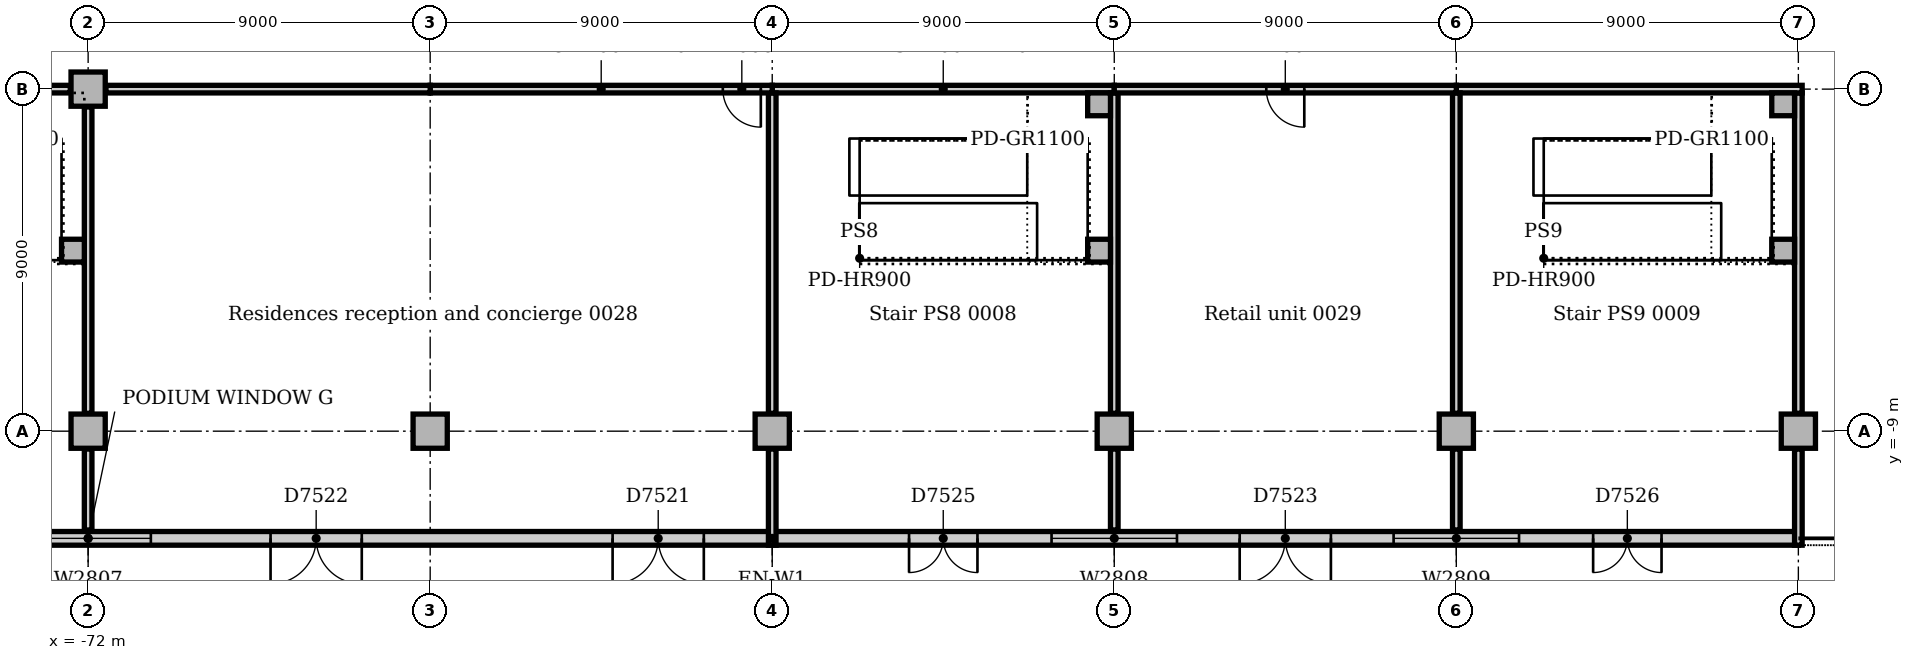
"""IFC4 building model, lengths in metres.
Left out: names, types, materials, properties, quantities, classifications, styles, units other than length and angle.
Written with IfcOpenShell. Run it as: python <this file> out.ifc"""

import sys

from ifc_helpers import new_model, si_unit, direction, frame, frame_2d, origin, origin_2d, place, context, subcontext, project, spatial, rectangle, extrude, element, fill, save


model = new_model("IFC4")
c1 = context("Model", 3, precision=1e-05, world=origin(), true_north=direction((0.0, 1.0)))
c2 = subcontext(c1, "Body", "Model", "MODEL_VIEW")
j1 = project(units=[si_unit("LENGTHUNIT", "METRE"), si_unit("PLANEANGLEUNIT", "RADIAN")], contexts=[c1])
p1 = place(None, origin())
s1 = spatial("IfcSite", under=j1, at=p1, CompositionType="ELEMENT")
p2 = place(p1, origin())
s2 = spatial("IfcBuilding", under=s1, at=p2, CompositionType="ELEMENT")
p3 = place(p2, origin())
s3 = spatial("IfcBuildingStorey", under=s2, at=p3, CompositionType="ELEMENT", Elevation=0.0)
for number, where, z_axis, x_axis in (
    (1, (-72.0, -9.0, 0.0), (0.0, 0.0, 1.0), (1.0, 0.0, 0.0)),
    (2, (-72.0, 0.0, 0.0), (0.0, 0.0, 1.0), (1.0, 0.0, 0.0)),
    (3, (-63.0, -9.0, 0.0), (0.0, 0.0, 1.0), (1.0, 0.0, 0.0)),
    (4, (-54.0, -9.0, 0.0), (0.0, 0.0, 1.0), (1.0, 0.0, 0.0)),
    (5, (-45.0, -9.0, 0.0), (0.0, 0.0, 1.0), (1.0, 0.0, 0.0)),
    (6, (-36.0, -9.0, 0.0), (0.0, 0.0, 1.0), (1.0, 0.0, 0.0)),
    (7, (-27.0, -9.0, 0.0), (0.0, 0.0, 1.0), (1.0, 0.0, 0.0)),
):
    element("IfcColumn", number, at=place(p3, frame(where, z_axis=z_axis, x_axis=x_axis)), inside=s3, PredefinedType="COLUMN", context=c2, shape_type="SweptSolid", body=[
        extrude(rectangle(XDim=0.9, YDim=0.9, at=origin_2d()), origin(), (0.0, 0.0, 1.0), 5.7),
    ])
p4 = place(p3, frame((-81.0, -11.82, 0.0), z_axis=(0.0, 0.0, 1.0), x_axis=(1.0, 0.0, 0.0)))
e8 = element("IfcWall", 8, at=p4, inside=s3, PredefinedType="STANDARD", context=c2, shape_type="SweptSolid", body=[
    extrude(rectangle(XDim=54.0, YDim=0.36, at=frame_2d((27.0, 0.0))), origin(), (0.0, 0.0, 1.0), 5.7),
])
p5 = place(p4, frame((22.8, 0.0, 0.0)))
e9 = element("IfcOpeningElement", 9, at=p5, cuts=e8, PredefinedType="OPENING", context=c2, shape_type="SweptSolid", body=[
    extrude(rectangle(XDim=2.4, YDim=2.4, at=frame_2d((1.2, 1.2))), frame((0.0, 0.19, 0.0), z_axis=(0.0, -1.0, 0.0), x_axis=(1.0, 0.0, 0.0)), (0.0, 0.0, 1.0), 0.38),
])
p6 = place(p4, frame((13.8, 0.0, 0.0)))
e10 = element("IfcOpeningElement", 10, at=p6, cuts=e8, PredefinedType="OPENING", context=c2, shape_type="SweptSolid", body=[
    extrude(rectangle(XDim=2.4, YDim=2.2, at=frame_2d((1.2, 1.1))), frame((0.0, 0.19, 0.0), z_axis=(0.0, -1.0, 0.0), x_axis=(1.0, 0.0, 0.0)), (0.0, 0.0, 1.0), 0.38),
])
p7 = place(p4, frame((39.3, 0.0, 0.0)))
e11 = element("IfcOpeningElement", 11, at=p7, cuts=e8, PredefinedType="OPENING", context=c2, shape_type="SweptSolid", body=[
    extrude(rectangle(XDim=2.4, YDim=2.2, at=frame_2d((1.2, 1.1))), frame((0.0, 0.19, 0.0), z_axis=(0.0, -1.0, 0.0), x_axis=(1.0, 0.0, 0.0)), (0.0, 0.0, 1.0), 0.38),
])
p8 = place(p4, frame((2.1, 0.0, 0.0)))
e12 = element("IfcOpeningElement", 12, at=p8, cuts=e8, PredefinedType="OPENING", context=c2, shape_type="SweptSolid", body=[
    extrude(rectangle(XDim=1.8, YDim=2.2, at=frame_2d((0.9, 1.1))), frame((0.0, 0.19, 0.0), z_axis=(0.0, -1.0, 0.0), x_axis=(1.0, 0.0, 0.0)), (0.0, 0.0, 1.0), 0.38),
])
p9 = place(p4, frame((30.6, 0.0, 0.0)))
e13 = element("IfcOpeningElement", 13, at=p9, cuts=e8, PredefinedType="OPENING", context=c2, shape_type="SweptSolid", body=[
    extrude(rectangle(XDim=1.8, YDim=2.2, at=frame_2d((0.9, 1.1))), frame((0.0, 0.19, 0.0), z_axis=(0.0, -1.0, 0.0), x_axis=(1.0, 0.0, 0.0)), (0.0, 0.0, 1.0), 0.38),
])
p10 = place(p4, frame((48.6, 0.0, 0.0)))
e14 = element("IfcOpeningElement", 14, at=p10, cuts=e8, PredefinedType="OPENING", context=c2, shape_type="SweptSolid", body=[
    extrude(rectangle(XDim=1.8, YDim=2.2, at=frame_2d((0.9, 1.1))), frame((0.0, 0.19, 0.0), z_axis=(0.0, -1.0, 0.0), x_axis=(1.0, 0.0, 0.0)), (0.0, 0.0, 1.0), 0.38),
])
p11 = place(p4, frame((7.35, 0.0, 0.6)))
e15 = element("IfcOpeningElement", 15, at=p11, cuts=e8, PredefinedType="OPENING", context=c2, shape_type="SweptSolid", body=[
    extrude(rectangle(XDim=3.3, YDim=3.0, at=frame_2d((1.65, 1.5))), frame((0.0, 0.19, 0.0), z_axis=(0.0, -1.0, 0.0), x_axis=(1.0, 0.0, 0.0)), (0.0, 0.0, 1.0), 0.38),
])
p12 = place(p4, frame((34.35, 0.0, 0.6)))
e16 = element("IfcOpeningElement", 16, at=p12, cuts=e8, PredefinedType="OPENING", context=c2, shape_type="SweptSolid", body=[
    extrude(rectangle(XDim=3.3, YDim=3.0, at=frame_2d((1.65, 1.5))), frame((0.0, 0.19, 0.0), z_axis=(0.0, -1.0, 0.0), x_axis=(1.0, 0.0, 0.0)), (0.0, 0.0, 1.0), 0.38),
])
p13 = place(p4, frame((43.35, 0.0, 0.6)))
e17 = element("IfcOpeningElement", 17, at=p13, cuts=e8, PredefinedType="OPENING", context=c2, shape_type="SweptSolid", body=[
    extrude(rectangle(XDim=3.3, YDim=3.0, at=frame_2d((1.65, 1.5))), frame((0.0, 0.19, 0.0), z_axis=(0.0, -1.0, 0.0), x_axis=(1.0, 0.0, 0.0)), (0.0, 0.0, 1.0), 0.38),
])
for number, where, z_axis, x_axis in (
    (18, (-72.4, -4.25, 0.0), (0.0, 0.0, 1.0), (1.0, 0.0, 0.0)),
    (19, (-45.4, -4.25, 0.0), (0.0, 0.0, 1.0), (1.0, 0.0, 0.0)),
    (20, (-45.4, -0.4, 0.0), (0.0, 0.0, 1.0), (1.0, 0.0, 0.0)),
    (21, (-27.4, -4.25, 0.0), (0.0, 0.0, 1.0), (1.0, 0.0, 0.0)),
    (22, (-27.4, -0.4, 0.0), (0.0, 0.0, 1.0), (1.0, 0.0, 0.0)),
):
    element("IfcColumn", number, at=place(p3, frame(where, z_axis=z_axis, x_axis=x_axis)), inside=s3, PredefinedType="COLUMN", context=c2, shape_type="SweptSolid", body=[
        extrude(rectangle(XDim=0.6, YDim=0.6, at=origin_2d()), origin(), (0.0, 0.0, 1.0), 6.0),
    ])
p14 = place(p3, frame((-80.53, 0.0, 0.0), z_axis=(0.0, 0.0, 1.0), x_axis=(1.0, 0.0, 0.0)))
e23 = element("IfcWall", 23, at=p14, inside=s3, PredefinedType="SOLIDWALL", context=c2, shape_type="SweptSolid", body=[
    extrude(rectangle(XDim=8.06, YDim=0.2, at=frame_2d((4.03, 0.0))), origin(), (0.0, 0.0, 1.0), 5.7),
])
p15 = place(p3, frame((-72.0, -11.6, 0.0), z_axis=(0.0, 0.0, 1.0), x_axis=(0.0, 1.0, 0.0)))
e24 = element("IfcWall", 24, at=p15, inside=s3, PredefinedType="SOLIDWALL", context=c2, shape_type="SweptSolid", body=[
    extrude(rectangle(XDim=2.13, YDim=0.2, at=frame_2d((1.065, 0.0))), origin(), (0.0, 0.0, 1.0), 5.7),
])
p16 = place(p3, frame((-72.0, -8.53, 0.0), z_axis=(0.0, 0.0, 1.0), x_axis=(0.0, 1.0, 0.0)))
e25 = element("IfcWall", 25, at=p16, inside=s3, PredefinedType="SOLIDWALL", context=c2, shape_type="SweptSolid", body=[
    extrude(rectangle(XDim=8.06, YDim=0.2, at=frame_2d((4.03, 0.0))), origin(), (0.0, 0.0, 1.0), 5.7),
])
p17 = place(p3, frame((-54.0, 0.0, 0.0), z_axis=(0.0, 0.0, 1.0), x_axis=(1.0, 0.0, 0.0)))
e26 = element("IfcWall", 26, at=p17, inside=s3, PredefinedType="SOLIDWALL", context=c2, shape_type="SweptSolid", body=[
    extrude(rectangle(XDim=9.0, YDim=0.2, at=frame_2d((4.5, 0.0))), origin(), (0.0, 0.0, 1.0), 5.7),
])
p18 = place(p3, frame((-54.0, -12.0, 0.0), z_axis=(0.0, 0.0, 1.0), x_axis=(0.0, 1.0, 0.0)))
e27 = element("IfcWall", 27, at=p18, inside=s3, PredefinedType="SOLIDWALL", context=c2, shape_type="SweptSolid", body=[
    extrude(rectangle(XDim=2.53, YDim=0.2, at=frame_2d((1.265, 0.0))), origin(), (0.0, 0.0, 1.0), 5.7),
])
p19 = place(p3, frame((-54.0, -8.53, 0.0), z_axis=(0.0, 0.0, 1.0), x_axis=(0.0, 1.0, 0.0)))
e28 = element("IfcWall", 28, at=p19, inside=s3, PredefinedType="SOLIDWALL", context=c2, shape_type="SweptSolid", body=[
    extrude(rectangle(XDim=8.43, YDim=0.2, at=frame_2d((4.215, 0.0))), origin(), (0.0, 0.0, 1.0), 5.7),
])
p20 = place(p3, frame((-45.0, -11.6, 0.0), z_axis=(0.0, 0.0, 1.0), x_axis=(0.0, 1.0, 0.0)))
e29 = element("IfcWall", 29, at=p20, inside=s3, PredefinedType="SOLIDWALL", context=c2, shape_type="SweptSolid", body=[
    extrude(rectangle(XDim=2.13, YDim=0.2, at=frame_2d((1.065, 0.0))), origin(), (0.0, 0.0, 1.0), 5.7),
])
p21 = place(p3, frame((-45.0, -8.53, 0.0), z_axis=(0.0, 0.0, 1.0), x_axis=(0.0, 1.0, 0.0)))
e30 = element("IfcWall", 30, at=p21, inside=s3, PredefinedType="SOLIDWALL", context=c2, shape_type="SweptSolid", body=[
    extrude(rectangle(XDim=8.43, YDim=0.2, at=frame_2d((4.215, 0.0))), origin(), (0.0, 0.0, 1.0), 5.7),
])
p22 = place(p3, frame((-27.0, -12.0, 0.0), z_axis=(0.0, 0.0, 1.0), x_axis=(0.0, 1.0, 0.0)))
e31 = element("IfcWall", 31, at=p22, inside=s3, PredefinedType="SOLIDWALL", context=c2, shape_type="SweptSolid", body=[
    extrude(rectangle(XDim=2.53, YDim=0.2, at=frame_2d((1.265, 0.0))), origin(), (0.0, 0.0, 1.0), 5.7),
])
p23 = place(p3, frame((-27.0, -8.53, 0.0), z_axis=(0.0, 0.0, 1.0), x_axis=(0.0, 1.0, 0.0)))
e32 = element("IfcWall", 32, at=p23, inside=s3, PredefinedType="SOLIDWALL", context=c2, shape_type="SweptSolid", body=[
    extrude(rectangle(XDim=8.43, YDim=0.2, at=frame_2d((4.215, 0.0))), origin(), (0.0, 0.0, 1.0), 5.7),
])
p24 = place(p3, frame((-36.0, 0.0, 0.0), z_axis=(0.0, 0.0, 1.0), x_axis=(1.0, 0.0, 0.0)))
e33 = element("IfcWall", 33, at=p24, inside=s3, PredefinedType="SOLIDWALL", context=c2, shape_type="SweptSolid", body=[
    extrude(rectangle(XDim=9.1, YDim=0.2, at=frame_2d((4.55, 0.0))), origin(), (0.0, 0.0, 1.0), 5.7),
])
p25 = place(p3, frame((-36.0, -11.6, 0.0), z_axis=(0.0, 0.0, 1.0), x_axis=(0.0, 1.0, 0.0)))
e34 = element("IfcWall", 34, at=p25, inside=s3, PredefinedType="SOLIDWALL", context=c2, shape_type="SweptSolid", body=[
    extrude(rectangle(XDim=2.13, YDim=0.2, at=frame_2d((1.065, 0.0))), origin(), (0.0, 0.0, 1.0), 5.7),
])
p26 = place(p3, frame((-36.0, -8.53, 0.0), z_axis=(0.0, 0.0, 1.0), x_axis=(0.0, 1.0, 0.0)))
e35 = element("IfcWall", 35, at=p26, inside=s3, PredefinedType="SOLIDWALL", context=c2, shape_type="SweptSolid", body=[
    extrude(rectangle(XDim=8.43, YDim=0.2, at=frame_2d((4.215, 0.0))), origin(), (0.0, 0.0, 1.0), 5.7),
])
p27 = place(p3, frame((-63.0, 0.0, 0.0), z_axis=(0.0, 0.0, 1.0), x_axis=(1.0, 0.0, 0.0)))
e36 = element("IfcWall", 36, at=p27, inside=s3, PredefinedType="PARTITIONING", context=c2, shape_type="SweptSolid", body=[
    extrude(rectangle(XDim=9.0, YDim=0.2, at=frame_2d((4.5, 0.0))), origin(), (0.0, 0.0, 1.0), 5.7),
])
p28 = place(p27, frame((7.7, 0.0, 0.0)))
e37 = element("IfcOpeningElement", 37, at=p28, cuts=e36, PredefinedType="OPENING", context=c2, shape_type="SweptSolid", body=[
    extrude(rectangle(XDim=1.0, YDim=2.1, at=frame_2d((0.5, 1.05))), frame((0.0, 0.11, 0.0), z_axis=(0.0, -1.0, 0.0), x_axis=(1.0, 0.0, 0.0)), (0.0, 0.0, 1.0), 0.22),
])
p29 = place(p3, frame((-71.53, 0.0, 0.0), z_axis=(0.0, 0.0, 1.0), x_axis=(1.0, 0.0, 0.0)))
e38 = element("IfcWall", 38, at=p29, inside=s3, PredefinedType="PARTITIONING", context=c2, shape_type="SweptSolid", body=[
    extrude(rectangle(XDim=8.53, YDim=0.2, at=frame_2d((4.265, 0.0))), origin(), (0.0, 0.0, 1.0), 5.7),
])
p30 = place(p3, frame((-45.0, 0.0, 0.0), z_axis=(0.0, 0.0, 1.0), x_axis=(1.0, 0.0, 0.0)))
e39 = element("IfcWall", 39, at=p30, inside=s3, PredefinedType="PARTITIONING", context=c2, shape_type="SweptSolid", body=[
    extrude(rectangle(XDim=9.0, YDim=0.2, at=frame_2d((4.5, 0.0))), origin(), (0.0, 0.0, 1.0), 5.7),
])
p31 = place(p30, frame((4.0, 0.0, 0.0)))
e40 = element("IfcOpeningElement", 40, at=p31, cuts=e39, PredefinedType="OPENING", context=c2, shape_type="SweptSolid", body=[
    extrude(rectangle(XDim=1.0, YDim=2.1, at=frame_2d((0.5, 1.05))), frame((0.0, 0.11, 0.0), z_axis=(0.0, -1.0, 0.0), x_axis=(1.0, 0.0, 0.0)), (0.0, 0.0, 1.0), 0.22),
])
p32 = place(p5, frame((2.4, 0.0, 0.0), z_axis=(0.0, 0.0, 1.0), x_axis=(-1.0, 0.0, 0.0)))
e41 = element("IfcDoor", 41, at=p32, inside=s3, OperationType="DOUBLE_DOOR_SINGLE_SWING", PredefinedType="DOOR", context=c2, shape_type="SweptSolid", body=[
    extrude(rectangle(XDim=2.4, YDim=2.4, at=frame_2d((1.2, 1.2))), frame((0.0, -0.07, 0.0), z_axis=(0.0, -1.0, 0.0), x_axis=(1.0, 0.0, 0.0)), (0.0, 0.0, 1.0), 0.05),
])
fill(e9, e41)
p33 = place(p6, frame((2.4, 0.0, 0.0), z_axis=(0.0, 0.0, 1.0), x_axis=(-1.0, 0.0, 0.0)))
e42 = element("IfcDoor", 42, at=p33, inside=s3, OperationType="DOUBLE_DOOR_SINGLE_SWING", PredefinedType="DOOR", context=c2, shape_type="SweptSolid", body=[
    extrude(rectangle(XDim=2.4, YDim=2.2, at=frame_2d((1.2, 1.1))), frame((0.0, -0.07, 0.0), z_axis=(0.0, -1.0, 0.0), x_axis=(1.0, 0.0, 0.0)), (0.0, 0.0, 1.0), 0.05),
])
fill(e10, e42)
p34 = place(p7, frame((2.4, 0.0, 0.0), z_axis=(0.0, 0.0, 1.0), x_axis=(-1.0, 0.0, 0.0)))
e43 = element("IfcDoor", 43, at=p34, inside=s3, OperationType="DOUBLE_DOOR_SINGLE_SWING", PredefinedType="DOOR", context=c2, shape_type="SweptSolid", body=[
    extrude(rectangle(XDim=2.4, YDim=2.2, at=frame_2d((1.2, 1.1))), frame((0.0, -0.07, 0.0), z_axis=(0.0, -1.0, 0.0), x_axis=(1.0, 0.0, 0.0)), (0.0, 0.0, 1.0), 0.05),
])
fill(e11, e43)
p35 = place(p9, frame((1.8, 0.0, 0.0), z_axis=(0.0, 0.0, 1.0), x_axis=(-1.0, 0.0, 0.0)))
e44 = element("IfcDoor", 44, at=p35, inside=s3, OperationType="DOUBLE_DOOR_SINGLE_SWING", PredefinedType="DOOR", context=c2, shape_type="SweptSolid", body=[
    extrude(rectangle(XDim=1.8, YDim=2.2, at=frame_2d((0.9, 1.1))), frame((0.0, -0.07, 0.0), z_axis=(0.0, -1.0, 0.0), x_axis=(1.0, 0.0, 0.0)), (0.0, 0.0, 1.0), 0.05),
])
fill(e13, e44)
p36 = place(p10, frame((1.8, 0.0, 0.0), z_axis=(0.0, 0.0, 1.0), x_axis=(-1.0, 0.0, 0.0)))
e45 = element("IfcDoor", 45, at=p36, inside=s3, OperationType="DOUBLE_DOOR_SINGLE_SWING", PredefinedType="DOOR", context=c2, shape_type="SweptSolid", body=[
    extrude(rectangle(XDim=1.8, YDim=2.2, at=frame_2d((0.9, 1.1))), frame((0.0, -0.07, 0.0), z_axis=(0.0, -1.0, 0.0), x_axis=(1.0, 0.0, 0.0)), (0.0, 0.0, 1.0), 0.05),
])
fill(e14, e45)
p37 = place(p11, origin())
e46 = element("IfcWindow", 46, at=p37, inside=s3, PartitioningType="SINGLE_PANEL", PredefinedType="WINDOW", context=c2, shape_type="SweptSolid", body=[
    extrude(rectangle(XDim=3.3, YDim=3.0, at=frame_2d((1.65, 1.5))), frame((0.0, 0.13, 0.0), z_axis=(0.0, -1.0, 0.0), x_axis=(1.0, 0.0, 0.0)), (0.0, 0.0, 1.0), 0.06),
])
fill(e15, e46)
p38 = place(p12, origin())
e47 = element("IfcWindow", 47, at=p38, inside=s3, PartitioningType="SINGLE_PANEL", PredefinedType="WINDOW", context=c2, shape_type="SweptSolid", body=[
    extrude(rectangle(XDim=3.3, YDim=3.0, at=frame_2d((1.65, 1.5))), frame((0.0, 0.13, 0.0), z_axis=(0.0, -1.0, 0.0), x_axis=(1.0, 0.0, 0.0)), (0.0, 0.0, 1.0), 0.06),
])
fill(e16, e47)
p39 = place(p13, origin())
e48 = element("IfcWindow", 48, at=p39, inside=s3, PartitioningType="SINGLE_PANEL", PredefinedType="WINDOW", context=c2, shape_type="SweptSolid", body=[
    extrude(rectangle(XDim=3.3, YDim=3.0, at=frame_2d((1.65, 1.5))), frame((0.0, 0.13, 0.0), z_axis=(0.0, -1.0, 0.0), x_axis=(1.0, 0.0, 0.0)), (0.0, 0.0, 1.0), 0.06),
])
fill(e17, e48)
p40 = place(p28, frame((1.0, 0.0, 0.0), z_axis=(0.0, 0.0, 1.0), x_axis=(-1.0, 0.0, 0.0)))
e49 = element("IfcDoor", 49, at=p40, inside=s3, OperationType="SINGLE_SWING_LEFT", PredefinedType="DOOR", context=c2, shape_type="SweptSolid", body=[
    extrude(rectangle(XDim=1.0, YDim=2.1, at=frame_2d((0.5, 1.05))), frame((0.0, 0.025, 0.0), z_axis=(0.0, -1.0, 0.0), x_axis=(1.0, 0.0, 0.0)), (0.0, 0.0, 1.0), 0.05),
])
fill(e37, e49)
p41 = place(p31, frame((1.0, 0.0, 0.0), z_axis=(0.0, 0.0, 1.0), x_axis=(-1.0, 0.0, 0.0)))
e50 = element("IfcDoor", 50, at=p41, inside=s3, OperationType="SINGLE_SWING_LEFT", PredefinedType="DOOR", context=c2, shape_type="SweptSolid", body=[
    extrude(rectangle(XDim=1.0, YDim=2.1, at=frame_2d((0.5, 1.05))), frame((0.0, 0.025, 0.0), z_axis=(0.0, -1.0, 0.0), x_axis=(1.0, 0.0, 0.0)), (0.0, 0.0, 1.0), 0.05),
])
fill(e40, e50)
save(model, sys.argv[1])
